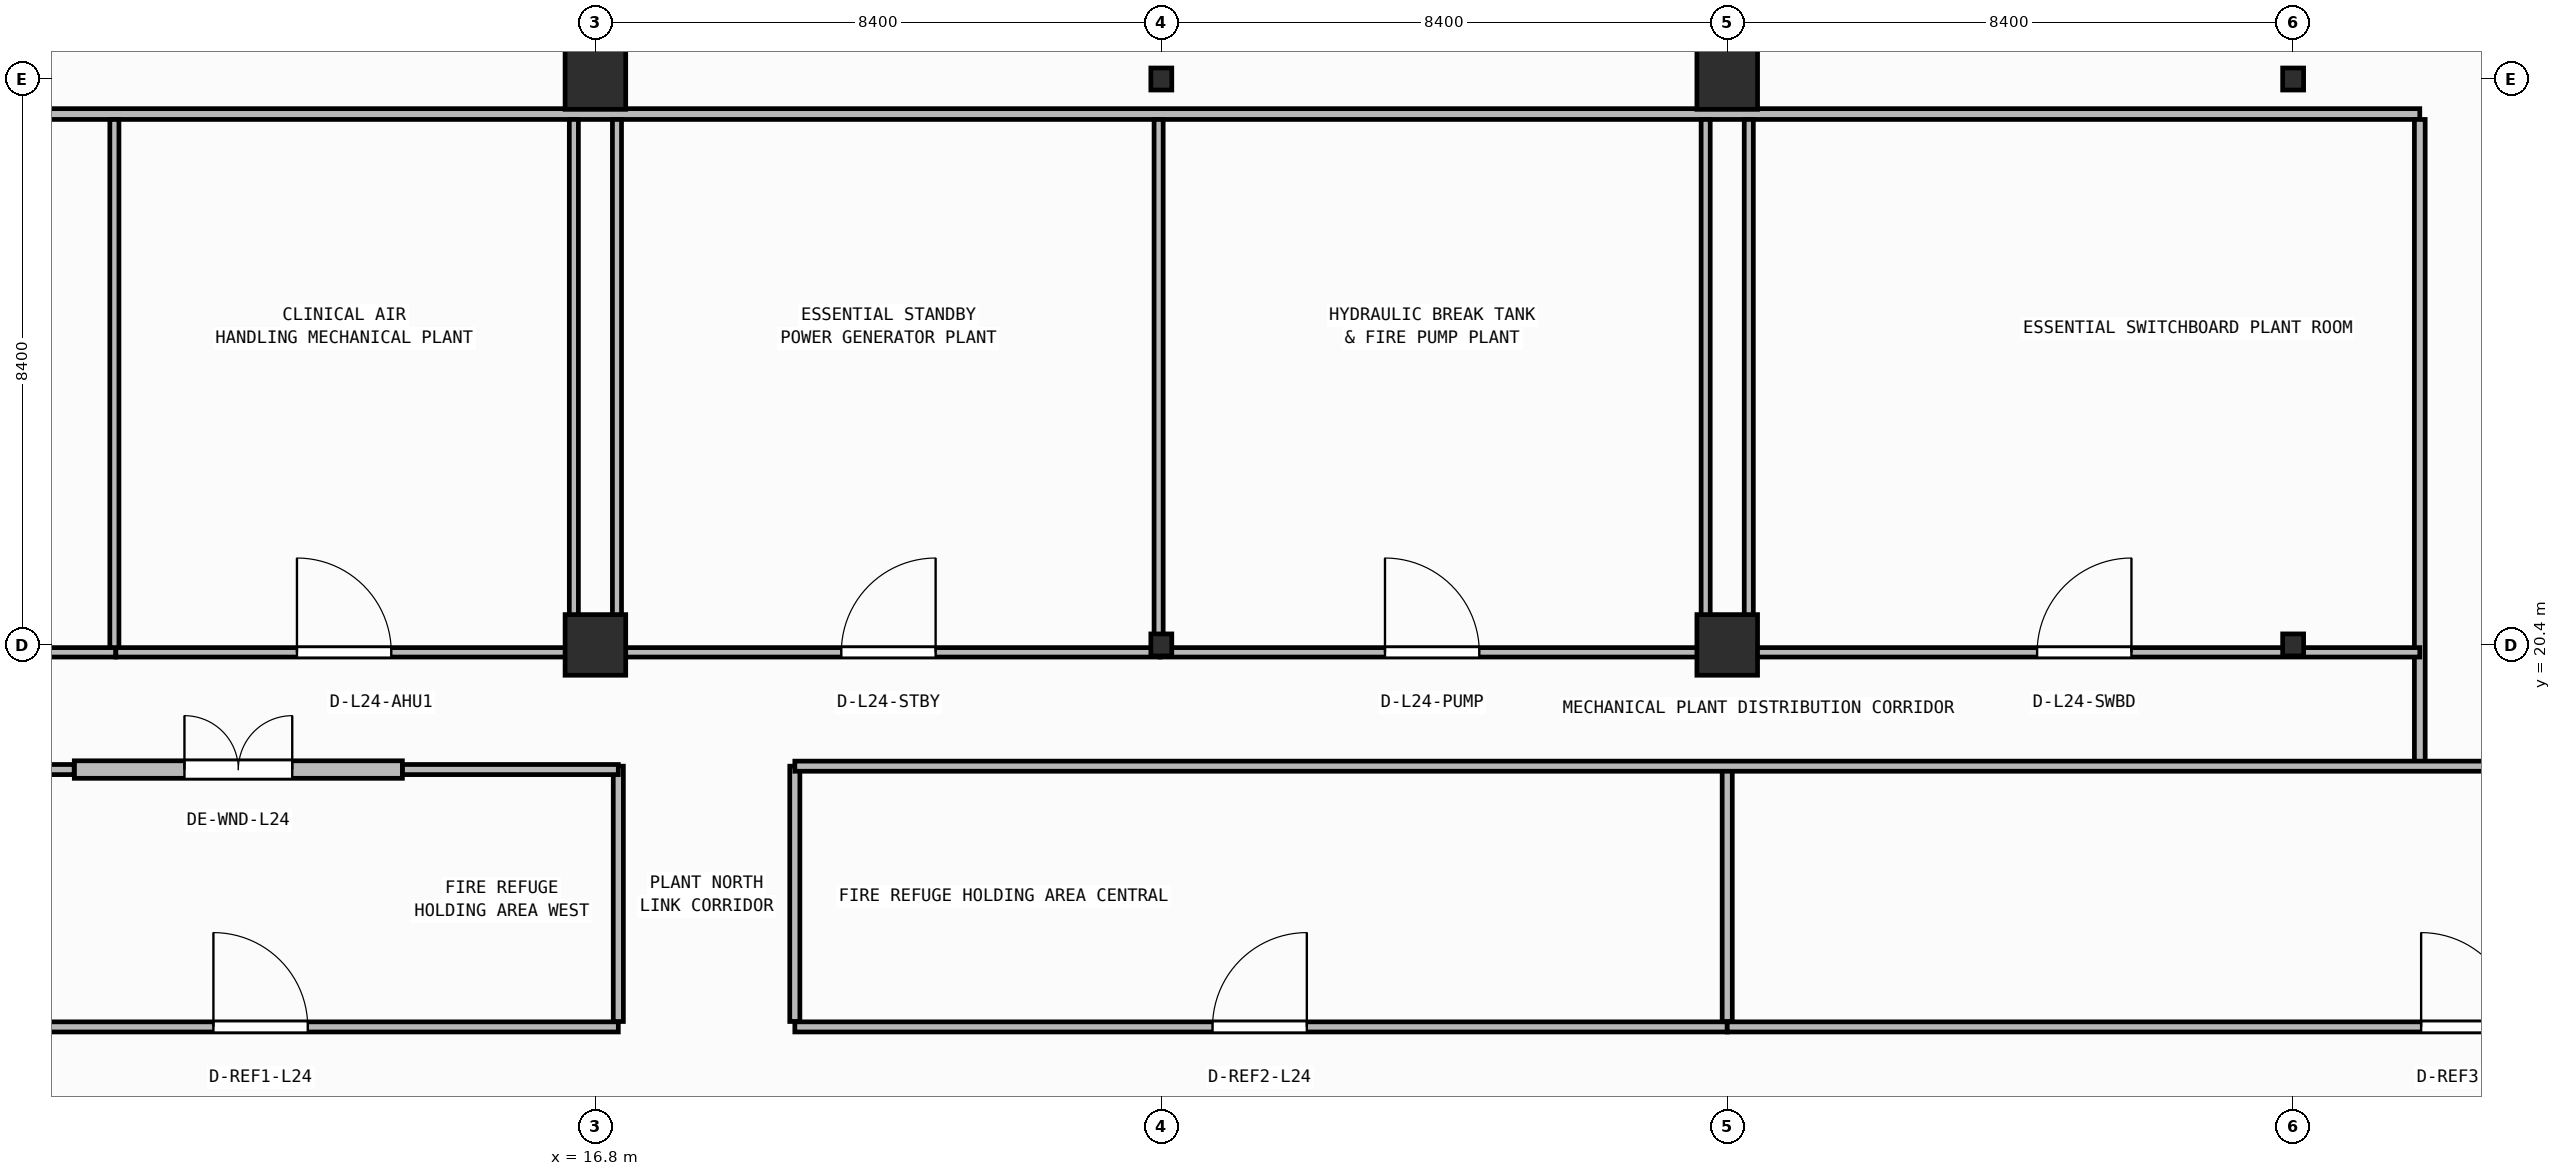
"""IFC4 building model, lengths in metres.
Left out: names, types, materials, properties, quantities, classifications, styles, units other than length and angle.
Written with IfcOpenShell. Run it as: python <this file> out.ifc"""

import sys

from ifc_helpers import new_model, si_unit, direction, frame, frame_2d, origin, origin_2d, place, context, subcontext, project, spatial, rectangle, i_section, extrude, element, fill, save


model = new_model("IFC4")
c1 = context("Model", 3, precision=1e-05, world=origin(), true_north=direction((0.0, 1.0)))
c2 = subcontext(c1, "Body", "Model", "MODEL_VIEW")
j1 = project(units=[si_unit("LENGTHUNIT", "METRE"), si_unit("PLANEANGLEUNIT", "RADIAN")], contexts=[c1])
p1 = place(None, origin())
s1 = spatial("IfcSite", under=j1, at=p1, CompositionType="ELEMENT")
p2 = place(p1, origin())
s2 = spatial("IfcBuilding", under=s1, at=p2, CompositionType="ELEMENT")
p3 = place(p2, frame((0.0, 0.0, 97.55)))
s3 = spatial("IfcBuildingStorey", under=s2, at=p3, CompositionType="ELEMENT", Elevation=97.55)
p4 = place(p3, frame((16.8, 20.4, 0.0), z_axis=(0.0, 0.0, 1.0), x_axis=(1.0, 0.0, 0.0)))
e1 = element("IfcColumn", 1, at=p4, inside=s3, PredefinedType="COLUMN", context=c2, shape_type="SweptSolid", body=[
    extrude(rectangle(XDim=0.9, YDim=0.9, at=origin_2d()), origin(), (0.0, 0.0, 1.0), 5.8),
])
p5 = place(p3, frame((25.2, 20.4, 0.0), z_axis=(0.0, 0.0, 1.0), x_axis=(1.0, 0.0, 0.0)))
e2 = element("IfcColumn", 2, at=p5, inside=s3, PredefinedType="COLUMN", context=c2, shape_type="SweptSolid", body=[
    extrude(i_section(OverallWidth=0.311, OverallDepth=0.327, WebThickness=0.016, FlangeThickness=0.025, FilletRadius=0.017, at=origin_2d()), origin(), (0.0, 0.0, 1.0), 5.8),
])
p6 = place(p3, frame((33.6, 20.4, 0.0), z_axis=(0.0, 0.0, 1.0), x_axis=(1.0, 0.0, 0.0)))
e3 = element("IfcColumn", 3, at=p6, inside=s3, PredefinedType="COLUMN", context=c2, shape_type="SweptSolid", body=[
    extrude(rectangle(XDim=0.9, YDim=0.9, at=origin_2d()), origin(), (0.0, 0.0, 1.0), 5.8),
])
p7 = place(p3, frame((42.0, 20.4, 0.0), z_axis=(0.0, 0.0, 1.0), x_axis=(1.0, 0.0, 0.0)))
e4 = element("IfcColumn", 4, at=p7, inside=s3, PredefinedType="COLUMN", context=c2, shape_type="SweptSolid", body=[
    extrude(i_section(OverallWidth=0.311, OverallDepth=0.327, WebThickness=0.016, FlangeThickness=0.025, FilletRadius=0.017, at=origin_2d()), origin(), (0.0, 0.0, 1.0), 5.8),
])
p8 = place(p3, frame((16.8, 28.8, 0.0), z_axis=(0.0, 0.0, 1.0), x_axis=(1.0, 0.0, 0.0)))
e5 = element("IfcColumn", 5, at=p8, inside=s3, PredefinedType="COLUMN", context=c2, shape_type="SweptSolid", body=[
    extrude(rectangle(XDim=0.9, YDim=0.9, at=origin_2d()), origin(), (0.0, 0.0, 1.0), 5.8),
])
p9 = place(p3, frame((25.2, 28.8, 0.0), z_axis=(0.0, 0.0, 1.0), x_axis=(1.0, 0.0, 0.0)))
e6 = element("IfcColumn", 6, at=p9, inside=s3, PredefinedType="COLUMN", context=c2, shape_type="SweptSolid", body=[
    extrude(i_section(OverallWidth=0.311, OverallDepth=0.327, WebThickness=0.016, FlangeThickness=0.025, FilletRadius=0.017, at=origin_2d()), origin(), (0.0, 0.0, 1.0), 5.8),
])
p10 = place(p3, frame((33.6, 28.8, 0.0), z_axis=(0.0, 0.0, 1.0), x_axis=(1.0, 0.0, 0.0)))
e7 = element("IfcColumn", 7, at=p10, inside=s3, PredefinedType="COLUMN", context=c2, shape_type="SweptSolid", body=[
    extrude(rectangle(XDim=0.9, YDim=0.9, at=origin_2d()), origin(), (0.0, 0.0, 1.0), 5.8),
])
p11 = place(p3, frame((42.0, 28.8, 0.0), z_axis=(0.0, 0.0, 1.0), x_axis=(1.0, 0.0, 0.0)))
e8 = element("IfcColumn", 8, at=p11, inside=s3, PredefinedType="COLUMN", context=c2, shape_type="SweptSolid", body=[
    extrude(i_section(OverallWidth=0.311, OverallDepth=0.327, WebThickness=0.016, FlangeThickness=0.025, FilletRadius=0.017, at=origin_2d()), origin(), (0.0, 0.0, 1.0), 5.8),
])
p12 = place(p3, frame((9.065, 18.55, 0.0), z_axis=(0.0, 0.0, 1.0), x_axis=(1.0, 0.0, 0.0)))
e9 = element("IfcWall", 9, at=p12, inside=s3, PredefinedType="STANDARD", context=c2, shape_type="SweptSolid", body=[
    extrude(rectangle(XDim=4.87, YDim=0.26, at=frame_2d((2.435, 0.0))), origin(), (0.0, 0.0, 1.0), 5.56),
])
p13 = place(p12, frame((1.635, 0.0, 0.0)))
e10 = element("IfcOpeningElement", 10, at=p13, cuts=e9, PredefinedType="OPENING", context=c2, shape_type="SweptSolid", body=[
    extrude(rectangle(XDim=1.6, YDim=2.2, at=frame_2d((0.8, 1.1))), frame((0.0, 0.14, 0.0), z_axis=(0.0, -1.0, 0.0), x_axis=(1.0, 0.0, 0.0)), (0.0, 0.0, 1.0), 0.28),
])
p14 = place(p3, frame((2.69, 28.28, 0.0), z_axis=(0.0, 0.0, 1.0), x_axis=(1.0, 0.0, 0.0)))
e11 = element("IfcWall", 11, at=p14, inside=s3, PredefinedType="PARTITIONING", context=c2, shape_type="SweptSolid", body=[
    extrude(rectangle(XDim=41.19, YDim=0.16, at=frame_2d((20.595, 0.0))), origin(), (0.0, 0.0, 1.0), 5.56),
])
p15 = place(p3, frame((43.88, 18.6, 0.0), z_axis=(0.0, 0.0, 1.0), x_axis=(0.0, 1.0, 0.0)))
e12 = element("IfcWall", 12, at=p15, inside=s3, PredefinedType="PARTITIONING", context=c2, shape_type="SweptSolid", body=[
    extrude(rectangle(XDim=9.6, YDim=0.16, at=frame_2d((4.8, 0.0))), origin(), (0.0, 0.0, 1.0), 5.56),
])
p16 = place(p3, frame((7.092, 14.73, 0.0), z_axis=(0.0, 0.0, 1.0), x_axis=(1.0, 0.0, 0.0)))
e13 = element("IfcWall", 13, at=p16, inside=s3, PredefinedType="PARTITIONING", context=c2, shape_type="SweptSolid", body=[
    extrude(rectangle(XDim=10.048, YDim=0.15, at=frame_2d((5.024, 0.0))), origin(), (0.0, 0.0, 1.0), 5.56),
])
p17 = place(p16, frame((4.038, 0.0, 0.0)))
e14 = element("IfcOpeningElement", 14, at=p17, cuts=e13, PredefinedType="OPENING", context=c2, shape_type="SweptSolid", body=[
    extrude(rectangle(XDim=1.4, YDim=2.15, at=frame_2d((0.7, 1.075))), frame((0.0, 0.085, 0.0), z_axis=(0.0, -1.0, 0.0), x_axis=(1.0, 0.0, 0.0)), (0.0, 0.0, 1.0), 0.17),
])
p18 = place(p3, frame((17.14, 14.81, 0.0), z_axis=(0.0, 0.0, 1.0), x_axis=(0.0, 1.0, 0.0)))
e15 = element("IfcWall", 15, at=p18, inside=s3, PredefinedType="PARTITIONING", context=c2, shape_type="SweptSolid", body=[
    extrude(rectangle(XDim=3.79, YDim=0.15, at=frame_2d((1.895, 0.0))), origin(), (0.0, 0.0, 1.0), 5.56),
])
p19 = place(p3, frame((2.85, 18.55, 0.0), z_axis=(0.0, 0.0, 1.0), x_axis=(1.0, 0.0, 0.0)))
e16 = element("IfcWall", 16, at=p19, inside=s3, PredefinedType="PARTITIONING", context=c2, shape_type="SweptSolid", body=[
    extrude(rectangle(XDim=6.213, YDim=0.15, at=frame_2d((3.106, 0.0))), origin(), (0.0, 0.0, 1.0), 5.56),
])
p20 = place(p3, frame((13.937, 18.55, 0.0), z_axis=(0.0, 0.0, 1.0), x_axis=(1.0, 0.0, 0.0)))
e17 = element("IfcWall", 17, at=p20, inside=s3, PredefinedType="PARTITIONING", context=c2, shape_type="SweptSolid", body=[
    extrude(rectangle(XDim=3.203, YDim=0.15, at=frame_2d((1.602, 0.0))), origin(), (0.0, 0.0, 1.0), 5.56),
])
p21 = place(p3, frame((19.76, 14.81, 0.0), z_axis=(0.0, 0.0, 1.0), x_axis=(0.0, 1.0, 0.0)))
e18 = element("IfcWall", 18, at=p21, inside=s3, PredefinedType="PARTITIONING", context=c2, shape_type="SweptSolid", body=[
    extrude(rectangle(XDim=3.79, YDim=0.15, at=frame_2d((1.895, 0.0))), origin(), (0.0, 0.0, 1.0), 5.56),
])
p22 = place(p3, frame((19.76, 14.73, 0.0), z_axis=(0.0, 0.0, 1.0), x_axis=(1.0, 0.0, 0.0)))
e19 = element("IfcWall", 19, at=p22, inside=s3, PredefinedType="PARTITIONING", context=c2, shape_type="SweptSolid", body=[
    extrude(rectangle(XDim=13.84, YDim=0.15, at=frame_2d((6.92, 0.0))), origin(), (0.0, 0.0, 1.0), 5.56),
])
p23 = place(p22, frame((6.2, 0.0, 0.0)))
e20 = element("IfcOpeningElement", 20, at=p23, cuts=e19, PredefinedType="OPENING", context=c2, shape_type="SweptSolid", body=[
    extrude(rectangle(XDim=1.4, YDim=2.15, at=frame_2d((0.7, 1.075))), frame((0.0, 0.085, 0.0), z_axis=(0.0, -1.0, 0.0), x_axis=(1.0, 0.0, 0.0)), (0.0, 0.0, 1.0), 0.17),
])
p24 = place(p3, frame((33.6, 14.81, 0.0), z_axis=(0.0, 0.0, 1.0), x_axis=(0.0, 1.0, 0.0)))
e21 = element("IfcWall", 21, at=p24, inside=s3, PredefinedType="PARTITIONING", context=c2, shape_type="SweptSolid", body=[
    extrude(rectangle(XDim=3.79, YDim=0.15, at=frame_2d((1.895, 0.0))), origin(), (0.0, 0.0, 1.0), 4.325),
])
p25 = place(p3, frame((33.6, 14.73, 0.0), z_axis=(0.0, 0.0, 1.0), x_axis=(1.0, 0.0, 0.0)))
e22 = element("IfcWall", 22, at=p25, inside=s3, PredefinedType="PARTITIONING", context=c2, shape_type="SweptSolid", body=[
    extrude(rectangle(XDim=22.0, YDim=0.15, at=frame_2d((11.0, 0.0))), origin(), (0.0, 0.0, 1.0), 5.56),
])
p26 = place(p25, frame((10.3, 0.0, 0.0)))
e23 = element("IfcOpeningElement", 23, at=p26, cuts=e22, PredefinedType="OPENING", context=c2, shape_type="SweptSolid", body=[
    extrude(rectangle(XDim=1.4, YDim=2.15, at=frame_2d((0.7, 1.075))), frame((0.0, 0.085, 0.0), z_axis=(0.0, -1.0, 0.0), x_axis=(1.0, 0.0, 0.0)), (0.0, 0.0, 1.0), 0.17),
])
p27 = place(p3, frame((19.76, 18.6, 0.0), z_axis=(0.0, 0.0, 1.0), x_axis=(1.0, 0.0, 0.0)))
e24 = element("IfcWall", 24, at=p27, inside=s3, PredefinedType="PARTITIONING", context=c2, shape_type="SweptSolid", body=[
    extrude(rectangle(XDim=35.84, YDim=0.15, at=frame_2d((17.92, 0.0))), origin(), (0.0, 0.0, 1.0), 5.56),
])
p28 = place(p3, frame((2.85, 20.29, 0.0), z_axis=(0.0, 0.0, 1.0), x_axis=(1.0, 0.0, 0.0)))
e25 = element("IfcWall", 25, at=p28, inside=s3, PredefinedType="PARTITIONING", context=c2, shape_type="SweptSolid", body=[
    extrude(rectangle(XDim=6.83, YDim=0.14, at=frame_2d((3.415, 0.0))), origin(), (0.0, 0.0, 1.0), 4.835),
])
p29 = place(p28, frame((2.715, 0.0, 0.0)))
e26 = element("IfcOpeningElement", 26, at=p29, cuts=e25, PredefinedType="OPENING", context=c2, shape_type="SweptSolid", body=[
    extrude(rectangle(XDim=1.4, YDim=2.15, at=frame_2d((0.7, 1.075))), frame((0.0, 0.08, 0.0), z_axis=(0.0, -1.0, 0.0), x_axis=(1.0, 0.0, 0.0)), (0.0, 0.0, 1.0), 0.16),
])
p30 = place(p3, frame((9.682, 20.29, 0.0), z_axis=(0.0, 0.0, 1.0), x_axis=(1.0, 0.0, 0.0)))
e27 = element("IfcWall", 27, at=p30, inside=s3, PredefinedType="PARTITIONING", context=c2, shape_type="SweptSolid", body=[
    extrude(rectangle(XDim=6.798, YDim=0.14, at=frame_2d((3.399, 0.0))), origin(), (0.0, 0.0, 1.0), 4.835),
])
p31 = place(p30, frame((2.688, 0.0, 0.0)))
e28 = element("IfcOpeningElement", 28, at=p31, cuts=e27, PredefinedType="OPENING", context=c2, shape_type="SweptSolid", body=[
    extrude(rectangle(XDim=1.4, YDim=2.15, at=frame_2d((0.7, 1.075))), frame((0.0, 0.08, 0.0), z_axis=(0.0, -1.0, 0.0), x_axis=(1.0, 0.0, 0.0)), (0.0, 0.0, 1.0), 0.16),
])
p32 = place(p3, frame((9.66, 20.36, 0.0), z_axis=(0.0, 0.0, 1.0), x_axis=(0.0, 1.0, 0.0)))
e29 = element("IfcWall", 29, at=p32, inside=s3, PredefinedType="PARTITIONING", context=c2, shape_type="SweptSolid", body=[
    extrude(rectangle(XDim=7.84, YDim=0.135, at=frame_2d((3.92, 0.0))), origin(), (0.0, 0.0, 1.0), 5.56),
])
p33 = place(p3, frame((16.48, 20.36, 0.0), z_axis=(0.0, 0.0, 1.0), x_axis=(0.0, 1.0, 0.0)))
e30 = element("IfcWall", 30, at=p33, inside=s3, PredefinedType="PARTITIONING", context=c2, shape_type="SweptSolid", body=[
    extrude(rectangle(XDim=7.84, YDim=0.135, at=frame_2d((3.92, 0.0))), origin(), (0.0, 0.0, 1.0), 4.325),
])
p34 = place(p3, frame((16.48, 20.29, 0.0), z_axis=(0.0, 0.0, 1.0), x_axis=(1.0, 0.0, 0.0)))
e31 = element("IfcWall", 31, at=p34, inside=s3, PredefinedType="PARTITIONING", context=c2, shape_type="SweptSolid", body=[
    extrude(rectangle(XDim=0.64, YDim=0.14, at=frame_2d((0.32, 0.0))), origin(), (0.0, 0.0, 1.0), 4.835),
])
p35 = place(p3, frame((17.12, 20.29, 0.0), z_axis=(0.0, 0.0, 1.0), x_axis=(1.0, 0.0, 0.0)))
e32 = element("IfcWall", 32, at=p35, inside=s3, PredefinedType="PARTITIONING", context=c2, shape_type="SweptSolid", body=[
    extrude(rectangle(XDim=8.06, YDim=0.14, at=frame_2d((4.03, 0.0))), origin(), (0.0, 0.0, 1.0), 4.835),
])
p36 = place(p35, frame((3.33, 0.0, 0.0)))
e33 = element("IfcOpeningElement", 33, at=p36, cuts=e32, PredefinedType="OPENING", context=c2, shape_type="SweptSolid", body=[
    extrude(rectangle(XDim=1.4, YDim=2.15, at=frame_2d((0.7, 1.075))), frame((0.0, 0.08, 0.0), z_axis=(0.0, -1.0, 0.0), x_axis=(1.0, 0.0, 0.0)), (0.0, 0.0, 1.0), 0.16),
])
p37 = place(p3, frame((17.12, 20.36, 0.0), z_axis=(0.0, 0.0, 1.0), x_axis=(0.0, 1.0, 0.0)))
e34 = element("IfcWall", 34, at=p37, inside=s3, PredefinedType="PARTITIONING", context=c2, shape_type="SweptSolid", body=[
    extrude(rectangle(XDim=7.84, YDim=0.135, at=frame_2d((3.92, 0.0))), origin(), (0.0, 0.0, 1.0), 4.325),
])
p38 = place(p3, frame((25.182, 20.29, 0.0), z_axis=(0.0, 0.0, 1.0), x_axis=(1.0, 0.0, 0.0)))
e35 = element("IfcWall", 35, at=p38, inside=s3, PredefinedType="PARTITIONING", context=c2, shape_type="SweptSolid", body=[
    extrude(rectangle(XDim=8.098, YDim=0.14, at=frame_2d((4.049, 0.0))), origin(), (0.0, 0.0, 1.0), 4.835),
])
p39 = place(p38, frame((3.338, 0.0, 0.0)))
e36 = element("IfcOpeningElement", 36, at=p39, cuts=e35, PredefinedType="OPENING", context=c2, shape_type="SweptSolid", body=[
    extrude(rectangle(XDim=1.4, YDim=2.15, at=frame_2d((0.7, 1.075))), frame((0.0, 0.08, 0.0), z_axis=(0.0, -1.0, 0.0), x_axis=(1.0, 0.0, 0.0)), (0.0, 0.0, 1.0), 0.16),
])
for number, where, z_axis, x_axis in (
    (37, (25.16, 20.36, 0.0), (0.0, 0.0, 1.0), (0.0, 1.0, 0.0)),
    (38, (33.28, 20.36, 0.0), (0.0, 0.0, 1.0), (0.0, 1.0, 0.0)),
):
    element("IfcWall", number, at=place(p3, frame(where, z_axis=z_axis, x_axis=x_axis)), inside=s3, PredefinedType="PARTITIONING", context=c2, shape_type="SweptSolid", body=[
        extrude(rectangle(XDim=7.84, YDim=0.135, at=frame_2d((3.92, 0.0))), origin(), (0.0, 0.0, 1.0), 4.325),
    ])
p40 = place(p3, frame((33.28, 20.29, 0.0), z_axis=(0.0, 0.0, 1.0), x_axis=(1.0, 0.0, 0.0)))
e39 = element("IfcWall", 39, at=p40, inside=s3, PredefinedType="PARTITIONING", context=c2, shape_type="SweptSolid", body=[
    extrude(rectangle(XDim=0.64, YDim=0.14, at=frame_2d((0.32, 0.0))), origin(), (0.0, 0.0, 1.0), 4.835),
])
p41 = place(p3, frame((33.92, 20.29, 0.0), z_axis=(0.0, 0.0, 1.0), x_axis=(1.0, 0.0, 0.0)))
e40 = element("IfcWall", 40, at=p41, inside=s3, PredefinedType="PARTITIONING", context=c2, shape_type="SweptSolid", body=[
    extrude(rectangle(XDim=9.96, YDim=0.14, at=frame_2d((4.98, 0.0))), origin(), (0.0, 0.0, 1.0), 4.835),
])
p42 = place(p41, frame((4.28, 0.0, 0.0)))
e41 = element("IfcOpeningElement", 41, at=p42, cuts=e40, PredefinedType="OPENING", context=c2, shape_type="SweptSolid", body=[
    extrude(rectangle(XDim=1.4, YDim=2.15, at=frame_2d((0.7, 1.075))), frame((0.0, 0.08, 0.0), z_axis=(0.0, -1.0, 0.0), x_axis=(1.0, 0.0, 0.0)), (0.0, 0.0, 1.0), 0.16),
])
p43 = place(p3, frame((33.92, 20.36, 0.0), z_axis=(0.0, 0.0, 1.0), x_axis=(0.0, 1.0, 0.0)))
e42 = element("IfcWall", 42, at=p43, inside=s3, PredefinedType="PARTITIONING", context=c2, shape_type="SweptSolid", body=[
    extrude(rectangle(XDim=7.84, YDim=0.135, at=frame_2d((3.92, 0.0))), origin(), (0.0, 0.0, 1.0), 4.325),
])
p44 = place(p13, origin())
e43 = element("IfcDoor", 43, at=p44, inside=s3, OperationType="DOUBLE_DOOR_SINGLE_SWING", PredefinedType="DOOR", context=c2, shape_type="SweptSolid", body=[
    extrude(rectangle(XDim=1.6, YDim=2.2, at=frame_2d((0.8, 1.1))), frame((0.0, 0.025, 0.0), z_axis=(0.0, -1.0, 0.0), x_axis=(1.0, 0.0, 0.0)), (0.0, 0.0, 1.0), 0.05),
])
fill(e10, e43)
p45 = place(p17, origin())
e44 = element("IfcDoor", 44, at=p45, inside=s3, OperationType="SINGLE_SWING_LEFT", PredefinedType="DOOR", context=c2, shape_type="SweptSolid", body=[
    extrude(rectangle(XDim=1.4, YDim=2.15, at=frame_2d((0.7, 1.075))), frame((0.0, 0.025, 0.0), z_axis=(0.0, -1.0, 0.0), x_axis=(1.0, 0.0, 0.0)), (0.0, 0.0, 1.0), 0.05),
])
fill(e14, e44)
p46 = place(p23, origin())
e45 = element("IfcDoor", 45, at=p46, inside=s3, OperationType="SINGLE_SWING_RIGHT", PredefinedType="DOOR", context=c2, shape_type="SweptSolid", body=[
    extrude(rectangle(XDim=1.4, YDim=2.15, at=frame_2d((0.7, 1.075))), frame((0.0, 0.025, 0.0), z_axis=(0.0, -1.0, 0.0), x_axis=(1.0, 0.0, 0.0)), (0.0, 0.0, 1.0), 0.05),
])
fill(e20, e45)
p47 = place(p26, origin())
e46 = element("IfcDoor", 46, at=p47, inside=s3, OperationType="SINGLE_SWING_LEFT", PredefinedType="DOOR", context=c2, shape_type="SweptSolid", body=[
    extrude(rectangle(XDim=1.4, YDim=2.15, at=frame_2d((0.7, 1.075))), frame((0.0, 0.025, 0.0), z_axis=(0.0, -1.0, 0.0), x_axis=(1.0, 0.0, 0.0)), (0.0, 0.0, 1.0), 0.05),
])
fill(e23, e46)
p48 = place(p31, origin())
e47 = element("IfcDoor", 47, at=p48, inside=s3, OperationType="SINGLE_SWING_LEFT", PredefinedType="DOOR", context=c2, shape_type="SweptSolid", body=[
    extrude(rectangle(XDim=1.4, YDim=2.15, at=frame_2d((0.7, 1.075))), frame((0.0, 0.025, 0.0), z_axis=(0.0, -1.0, 0.0), x_axis=(1.0, 0.0, 0.0)), (0.0, 0.0, 1.0), 0.05),
])
fill(e28, e47)
p49 = place(p36, origin())
e48 = element("IfcDoor", 48, at=p49, inside=s3, OperationType="SINGLE_SWING_RIGHT", PredefinedType="DOOR", context=c2, shape_type="SweptSolid", body=[
    extrude(rectangle(XDim=1.4, YDim=2.15, at=frame_2d((0.7, 1.075))), frame((0.0, 0.025, 0.0), z_axis=(0.0, -1.0, 0.0), x_axis=(1.0, 0.0, 0.0)), (0.0, 0.0, 1.0), 0.05),
])
fill(e33, e48)
p50 = place(p39, origin())
e49 = element("IfcDoor", 49, at=p50, inside=s3, OperationType="SINGLE_SWING_LEFT", PredefinedType="DOOR", context=c2, shape_type="SweptSolid", body=[
    extrude(rectangle(XDim=1.4, YDim=2.15, at=frame_2d((0.7, 1.075))), frame((0.0, 0.025, 0.0), z_axis=(0.0, -1.0, 0.0), x_axis=(1.0, 0.0, 0.0)), (0.0, 0.0, 1.0), 0.05),
])
fill(e36, e49)
p51 = place(p42, origin())
e50 = element("IfcDoor", 50, at=p51, inside=s3, OperationType="SINGLE_SWING_RIGHT", PredefinedType="DOOR", context=c2, shape_type="SweptSolid", body=[
    extrude(rectangle(XDim=1.4, YDim=2.15, at=frame_2d((0.7, 1.075))), frame((0.0, 0.025, 0.0), z_axis=(0.0, -1.0, 0.0), x_axis=(1.0, 0.0, 0.0)), (0.0, 0.0, 1.0), 0.05),
])
fill(e41, e50)
save(model, sys.argv[1])
